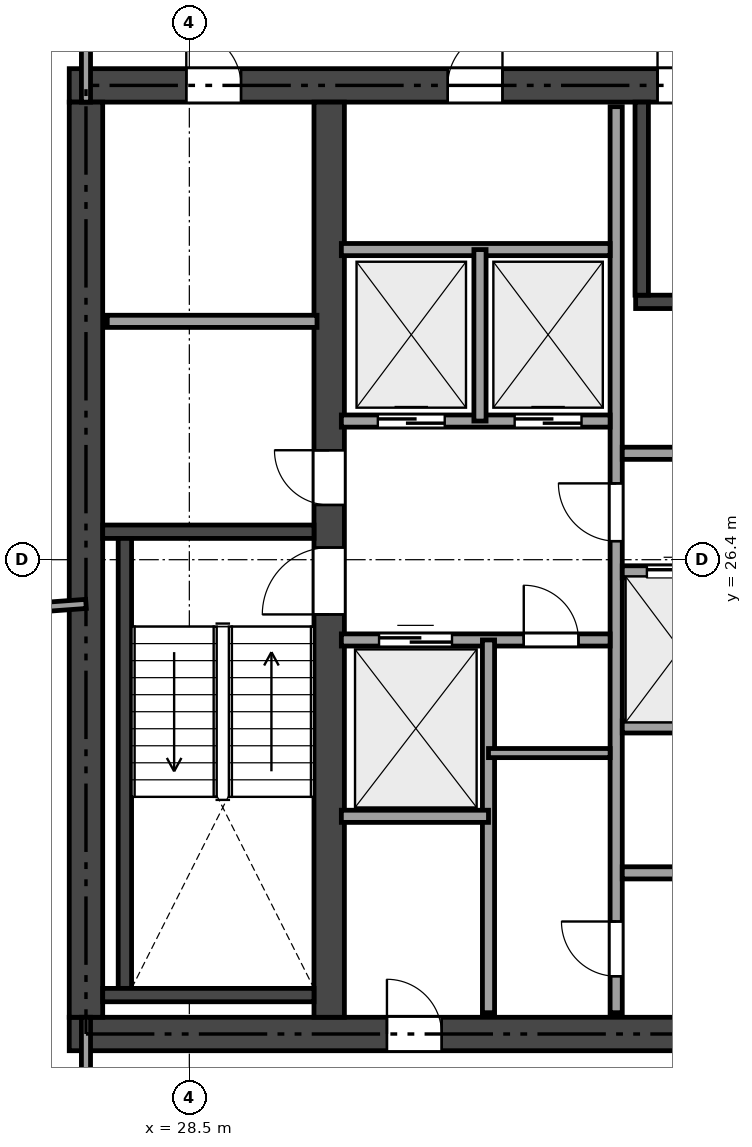
"""IFC4 building model, lengths in metres.
Left out: names, types, materials, properties, quantities, classifications, styles, units other than length and angle.
Written with IfcOpenShell. Run it as: python <this file> out.ifc"""

import sys

from ifc_helpers import new_model, si_unit, direction, frame, frame_2d, origin, place, context, subcontext, project, spatial, rectangle, extrude, element, fill, save


model = new_model("IFC4")
c1 = context("Model", 3, precision=1e-05, world=origin(), true_north=direction((0.0, 1.0)))
c2 = subcontext(c1, "Body", "Model", "MODEL_VIEW")
j1 = project(units=[si_unit("LENGTHUNIT", "METRE"), si_unit("PLANEANGLEUNIT", "RADIAN")], contexts=[c1])
p1 = place(None, origin())
s1 = spatial("IfcSite", under=j1, at=p1, CompositionType="ELEMENT")
p2 = place(p1, origin())
s2 = spatial("IfcBuilding", under=s1, at=p2, CompositionType="ELEMENT")
p3 = place(p2, frame((0.0, 0.0, 220.2)))
s3 = spatial("IfcBuildingStorey", under=s2, at=p3, CompositionType="ELEMENT", Elevation=220.2)
p4 = place(p3, frame((26.525, 18.6, 0.0), z_axis=(0.0, 0.0, 1.0), x_axis=(1.0, 0.0, 0.0)))
e1 = element("IfcWall", 1, at=p4, inside=s3, PredefinedType="SHEAR", context=c2, shape_type="SweptSolid", body=[
    extrude(rectangle(XDim=21.35, YDim=0.55, at=frame_2d((10.675, 0.0))), origin(), (0.0, 0.0, 1.0), 3.24),
])
p5 = place(p4, frame((12.4, 0.0, 0.0)))
e2 = element("IfcOpeningElement", 2, at=p5, cuts=e1, PredefinedType="OPENING", context=c2, shape_type="SweptSolid", body=[
    extrude(rectangle(XDim=1.15, YDim=2.15, at=frame_2d((0.575, 1.075))), frame((0.0, 0.285, 0.0), z_axis=(0.0, -1.0, 0.0), x_axis=(1.0, 0.0, 0.0)), (0.0, 0.0, 1.0), 0.57),
])
p6 = place(p4, frame((5.225, 0.0, 0.0)))
e3 = element("IfcOpeningElement", 3, at=p6, cuts=e1, PredefinedType="OPENING", context=c2, shape_type="SweptSolid", body=[
    extrude(rectangle(XDim=0.9, YDim=2.1, at=frame_2d((0.45, 1.05))), frame((0.0, 0.285, 0.0), z_axis=(0.0, -1.0, 0.0), x_axis=(1.0, 0.0, 0.0)), (0.0, 0.0, 1.0), 0.57),
])
p7 = place(p3, frame((26.525, 34.2, 0.0), z_axis=(0.0, 0.0, 1.0), x_axis=(1.0, 0.0, 0.0)))
e4 = element("IfcWall", 4, at=p7, inside=s3, PredefinedType="SHEAR", context=c2, shape_type="SweptSolid", body=[
    extrude(rectangle(XDim=21.35, YDim=0.55, at=frame_2d((10.675, 0.0))), origin(), (0.0, 0.0, 1.0), 3.24),
])
p8 = place(p7, frame((9.675, 0.0, 0.0)))
e5 = element("IfcOpeningElement", 5, at=p8, cuts=e4, PredefinedType="OPENING", context=c2, shape_type="SweptSolid", body=[
    extrude(rectangle(XDim=1.1, YDim=2.15, at=frame_2d((0.55, 1.075))), frame((0.0, 0.285, 0.0), z_axis=(0.0, -1.0, 0.0), x_axis=(1.0, 0.0, 0.0)), (0.0, 0.0, 1.0), 0.57),
])
p9 = place(p7, frame((1.925, 0.0, 0.0)))
e6 = element("IfcOpeningElement", 6, at=p9, cuts=e4, PredefinedType="OPENING", context=c2, shape_type="SweptSolid", body=[
    extrude(rectangle(XDim=0.9, YDim=2.1, at=frame_2d((0.45, 1.05))), frame((0.0, 0.285, 0.0), z_axis=(0.0, -1.0, 0.0), x_axis=(1.0, 0.0, 0.0)), (0.0, 0.0, 1.0), 0.57),
])
p10 = place(p7, frame((6.225, 0.0, 0.0)))
e7 = element("IfcOpeningElement", 7, at=p10, cuts=e4, PredefinedType="OPENING", context=c2, shape_type="SweptSolid", body=[
    extrude(rectangle(XDim=0.9, YDim=2.1, at=frame_2d((0.45, 1.05))), frame((0.0, 0.285, 0.0), z_axis=(0.0, -1.0, 0.0), x_axis=(1.0, 0.0, 0.0)), (0.0, 0.0, 1.0), 0.57),
])
p11 = place(p3, frame((26.8, 18.875, 0.0), z_axis=(0.0, 0.0, 1.0), x_axis=(0.0, 1.0, 0.0)))
e8 = element("IfcWall", 8, at=p11, inside=s3, PredefinedType="SHEAR", context=c2, shape_type="SweptSolid", body=[
    extrude(rectangle(XDim=15.05, YDim=0.55, at=frame_2d((7.525, 0.0))), origin(), (0.0, 0.0, 1.0), 3.24),
])
p12 = place(p3, frame((30.8, 18.875, 0.0), z_axis=(0.0, 0.0, 1.0), x_axis=(0.0, 1.0, 0.0)))
e9 = element("IfcWall", 9, at=p12, inside=s3, PredefinedType="SHEAR", context=c2, shape_type="SweptSolid", body=[
    extrude(rectangle(XDim=15.05, YDim=0.5, at=frame_2d((7.525, 0.0))), origin(), (0.0, 0.0, 1.0), 3.24),
])
p13 = place(p12, frame((6.625, 0.0, 0.0)))
e10 = element("IfcOpeningElement", 10, at=p13, cuts=e9, PredefinedType="OPENING", context=c2, shape_type="SweptSolid", body=[
    extrude(rectangle(XDim=1.1, YDim=2.15, at=frame_2d((0.55, 1.075))), frame((0.0, 0.26, 0.0), z_axis=(0.0, -1.0, 0.0), x_axis=(1.0, 0.0, 0.0)), (0.0, 0.0, 1.0), 0.52),
])
p14 = place(p12, frame((8.425, 0.0, 0.0)))
e11 = element("IfcOpeningElement", 11, at=p14, cuts=e9, PredefinedType="OPENING", context=c2, shape_type="SweptSolid", body=[
    extrude(rectangle(XDim=0.9, YDim=2.1, at=frame_2d((0.45, 1.05))), frame((0.0, 0.26, 0.0), z_axis=(0.0, -1.0, 0.0), x_axis=(1.0, 0.0, 0.0)), (0.0, 0.0, 1.0), 0.52),
])
p15 = place(p3, frame((27.075, 26.86, 0.0), z_axis=(0.0, 0.0, 1.0), x_axis=(1.0, 0.0, 0.0)))
e12 = element("IfcWall", 12, at=p15, inside=s3, PredefinedType="SHEAR", context=c2, shape_type="SweptSolid", body=[
    extrude(rectangle(XDim=3.475, YDim=0.22, at=frame_2d((1.738, 0.0))), origin(), (0.0, 0.0, 1.0), 3.24),
])
p16 = place(p3, frame((27.44, 19.35, 0.0), z_axis=(0.0, 0.0, 1.0), x_axis=(0.0, 1.0, 0.0)))
e13 = element("IfcWall", 13, at=p16, inside=s3, PredefinedType="SHEAR", context=c2, shape_type="SweptSolid", body=[
    extrude(rectangle(XDim=7.4, YDim=0.22, at=frame_2d((3.7, 0.0))), origin(), (0.0, 0.0, 1.0), 3.24),
])
p17 = place(p3, frame((27.075, 19.24, 0.0), z_axis=(0.0, 0.0, 1.0), x_axis=(1.0, 0.0, 0.0)))
e14 = element("IfcWall", 14, at=p17, inside=s3, PredefinedType="SHEAR", context=c2, shape_type="SweptSolid", body=[
    extrude(rectangle(XDim=3.475, YDim=0.22, at=frame_2d((1.738, 0.0))), origin(), (0.0, 0.0, 1.0), 3.24),
])
p18 = place(p3, frame((35.84, 30.64, 0.0), z_axis=(0.0, 0.0, 1.0), x_axis=(1.0, 0.0, 0.0)))
e15 = element("IfcWall", 15, at=p18, inside=s3, PredefinedType="SHEAR", context=c2, shape_type="SweptSolid", body=[
    extrude(rectangle(XDim=7.61, YDim=0.22, at=frame_2d((3.805, 0.0))), origin(), (0.0, 0.0, 1.0), 3.24),
])
p19 = place(p3, frame((35.94, 30.75, 0.0), z_axis=(0.0, 0.0, 1.0), x_axis=(0.0, 1.0, 0.0)))
e16 = element("IfcWall", 16, at=p19, inside=s3, PredefinedType="SHEAR", context=c2, shape_type="SweptSolid", body=[
    extrude(rectangle(XDim=3.175, YDim=0.22, at=frame_2d((1.587, 0.0))), origin(), (0.0, 0.0, 1.0), 3.24),
])
p20 = place(p3, frame((27.15, 30.32, 0.0), z_axis=(0.0, 0.0, 1.0), x_axis=(1.0, 0.0, 0.0)))
e17 = element("IfcWall", 17, at=p20, inside=s3, PredefinedType="SOLIDWALL", context=c2, shape_type="SweptSolid", body=[
    extrude(rectangle(XDim=3.45, YDim=0.2, at=frame_2d((1.725, 0.0))), origin(), (0.0, 0.0, 1.0), 3.24),
])
p21 = place(p3, frame((35.52, 18.95, 0.0), z_axis=(0.0, 0.0, 1.0), x_axis=(0.0, 1.0, 0.0)))
e18 = element("IfcWall", 18, at=p21, inside=s3, PredefinedType="SOLIDWALL", context=c2, shape_type="SweptSolid", body=[
    extrude(rectangle(XDim=14.9, YDim=0.2, at=frame_2d((7.45, 0.0))), origin(), (0.0, 0.0, 1.0), 2.761),
])
p22 = place(p21, frame((7.755, 0.0, 0.0)))
e19 = element("IfcOpeningElement", 19, at=p22, cuts=e18, PredefinedType="OPENING", context=c2, shape_type="SweptSolid", body=[
    extrude(rectangle(XDim=0.95, YDim=2.15, at=frame_2d((0.475, 1.075))), frame((0.0, 0.11, 0.0), z_axis=(0.0, -1.0, 0.0), x_axis=(1.0, 0.0, 0.0)), (0.0, 0.0, 1.0), 0.22),
])
p23 = place(p21, frame((0.6, 0.0, 0.0)))
e20 = element("IfcOpeningElement", 20, at=p23, cuts=e18, PredefinedType="OPENING", context=c2, shape_type="SweptSolid", body=[
    extrude(rectangle(XDim=0.9, YDim=2.1, at=frame_2d((0.45, 1.05))), frame((0.0, 0.11, 0.0), z_axis=(0.0, -1.0, 0.0), x_axis=(1.0, 0.0, 0.0)), (0.0, 0.0, 1.0), 0.22),
])
p24 = place(p3, frame((31.0, 28.68, 0.0), z_axis=(0.0, 0.0, 1.0), x_axis=(1.0, 0.0, 0.0)))
e21 = element("IfcWall", 21, at=p24, inside=s3, PredefinedType="SOLIDWALL", context=c2, shape_type="SweptSolid", body=[
    extrude(rectangle(XDim=4.42, YDim=0.2, at=frame_2d((2.21, 0.0))), origin(), (0.0, 0.0, 1.0), 3.24),
])
p25 = place(p24, frame((0.6, 0.0, 0.0)))
e22 = element("IfcOpeningElement", 22, at=p25, cuts=e21, PredefinedType="OPENING", context=c2, shape_type="SweptSolid", body=[
    extrude(rectangle(XDim=1.1, YDim=2.15, at=frame_2d((0.55, 1.075))), frame((0.0, 0.11, 0.0), z_axis=(0.0, -1.0, 0.0), x_axis=(1.0, 0.0, 0.0)), (0.0, 0.0, 1.0), 0.22),
])
p26 = place(p24, frame((2.85, 0.0, 0.0)))
e23 = element("IfcOpeningElement", 23, at=p26, cuts=e21, PredefinedType="OPENING", context=c2, shape_type="SweptSolid", body=[
    extrude(rectangle(XDim=1.1, YDim=2.15, at=frame_2d((0.55, 1.075))), frame((0.0, 0.11, 0.0), z_axis=(0.0, -1.0, 0.0), x_axis=(1.0, 0.0, 0.0)), (0.0, 0.0, 1.0), 0.22),
])
p27 = place(p3, frame((31.0, 31.5, 0.0), z_axis=(0.0, 0.0, 1.0), x_axis=(1.0, 0.0, 0.0)))
e24 = element("IfcWall", 24, at=p27, inside=s3, PredefinedType="SOLIDWALL", context=c2, shape_type="SweptSolid", body=[
    extrude(rectangle(XDim=4.42, YDim=0.2, at=frame_2d((2.21, 0.0))), origin(), (0.0, 0.0, 1.0), 3.24),
])
p28 = place(p3, frame((33.28, 28.68, 0.0), z_axis=(0.0, 0.0, 1.0), x_axis=(0.0, 1.0, 0.0)))
e25 = element("IfcWall", 25, at=p28, inside=s3, PredefinedType="SOLIDWALL", context=c2, shape_type="SweptSolid", body=[
    extrude(rectangle(XDim=2.82, YDim=0.2, at=frame_2d((1.41, 0.0))), origin(), (0.0, 0.0, 1.0), 3.24),
])
p29 = place(p3, frame((31.0, 25.08, 0.0), z_axis=(0.0, 0.0, 1.0), x_axis=(1.0, 0.0, 0.0)))
e26 = element("IfcWall", 26, at=p29, inside=s3, PredefinedType="SOLIDWALL", context=c2, shape_type="SweptSolid", body=[
    extrude(rectangle(XDim=4.42, YDim=0.2, at=frame_2d((2.21, 0.0))), origin(), (0.0, 0.0, 1.0), 3.24),
])
p30 = place(p29, frame((3.0, 0.0, 0.0)))
e27 = element("IfcOpeningElement", 27, at=p30, cuts=e26, PredefinedType="OPENING", context=c2, shape_type="SweptSolid", body=[
    extrude(rectangle(XDim=0.9, YDim=2.1, at=frame_2d((0.45, 1.05))), frame((0.0, 0.11, 0.0), z_axis=(0.0, -1.0, 0.0), x_axis=(1.0, 0.0, 0.0)), (0.0, 0.0, 1.0), 0.22),
])
p31 = place(p29, frame((0.62, 0.0, 0.0)))
e28 = element("IfcOpeningElement", 28, at=p31, cuts=e26, PredefinedType="OPENING", context=c2, shape_type="SweptSolid", body=[
    extrude(rectangle(XDim=1.2, YDim=2.15, at=frame_2d((0.6, 1.075))), frame((0.0, 0.11, 0.0), z_axis=(0.0, -1.0, 0.0), x_axis=(1.0, 0.0, 0.0)), (0.0, 0.0, 1.0), 0.22),
])
p32 = place(p3, frame((33.42, 18.95, 0.0), z_axis=(0.0, 0.0, 1.0), x_axis=(0.0, 1.0, 0.0)))
e29 = element("IfcWall", 29, at=p32, inside=s3, PredefinedType="SOLIDWALL", context=c2, shape_type="SweptSolid", body=[
    extrude(rectangle(XDim=6.13, YDim=0.2, at=frame_2d((3.065, 0.0))), origin(), (0.0, 0.0, 1.0), 2.761),
])
p33 = place(p3, frame((31.0, 22.18, 0.0), z_axis=(0.0, 0.0, 1.0), x_axis=(1.0, 0.0, 0.0)))
e30 = element("IfcWall", 30, at=p33, inside=s3, PredefinedType="SOLIDWALL", context=c2, shape_type="SweptSolid", body=[
    extrude(rectangle(XDim=2.42, YDim=0.2, at=frame_2d((1.21, 0.0))), origin(), (0.0, 0.0, 1.0), 3.24),
])
p34 = place(p3, frame((33.42, 23.22, 0.0), z_axis=(0.0, 0.0, 1.0), x_axis=(1.0, 0.0, 0.0)))
e31 = element("IfcWall", 31, at=p34, inside=s3, PredefinedType="PARTITIONING", context=c2, shape_type="SweptSolid", body=[
    extrude(rectangle(XDim=2.0, YDim=0.15, at=frame_2d((1.0, 0.0))), origin(), (0.0, 0.0, 1.0), 3.24),
])
p35 = place(p3, frame((35.62, 28.15, 0.0), z_axis=(0.0, 0.0, 1.0), x_axis=(1.0, 0.0, 0.0)))
e32 = element("IfcWall", 32, at=p35, inside=s3, PredefinedType="SOLIDWALL", context=c2, shape_type="SweptSolid", body=[
    extrude(rectangle(XDim=7.88, YDim=0.2, at=frame_2d((3.94, 0.0))), origin(), (0.0, 0.0, 1.0), 3.24),
])
p36 = place(p3, frame((35.62, 26.2, 0.0), z_axis=(0.0, 0.0, 1.0), x_axis=(1.0, 0.0, 0.0)))
e33 = element("IfcWall", 33, at=p36, inside=s3, PredefinedType="SOLIDWALL", context=c2, shape_type="SweptSolid", body=[
    extrude(rectangle(XDim=7.88, YDim=0.2, at=frame_2d((3.94, 0.0))), origin(), (0.0, 0.0, 1.0), 3.24),
])
p37 = place(p36, frame((0.405, 0.0, 0.0)))
e34 = element("IfcOpeningElement", 34, at=p37, cuts=e33, PredefinedType="OPENING", context=c2, shape_type="SweptSolid", body=[
    extrude(rectangle(XDim=1.1, YDim=2.15, at=frame_2d((0.55, 1.075))), frame((0.0, 0.11, 0.0), z_axis=(0.0, -1.0, 0.0), x_axis=(1.0, 0.0, 0.0)), (0.0, 0.0, 1.0), 0.22),
])
p38 = place(p36, frame((2.355, 0.0, 0.0)))
e35 = element("IfcOpeningElement", 35, at=p38, cuts=e33, PredefinedType="OPENING", context=c2, shape_type="SweptSolid", body=[
    extrude(rectangle(XDim=1.1, YDim=2.15, at=frame_2d((0.55, 1.075))), frame((0.0, 0.11, 0.0), z_axis=(0.0, -1.0, 0.0), x_axis=(1.0, 0.0, 0.0)), (0.0, 0.0, 1.0), 0.22),
])
p39 = place(p36, frame((4.305, 0.0, 0.0)))
e36 = element("IfcOpeningElement", 36, at=p39, cuts=e33, PredefinedType="OPENING", context=c2, shape_type="SweptSolid", body=[
    extrude(rectangle(XDim=1.1, YDim=2.15, at=frame_2d((0.55, 1.075))), frame((0.0, 0.11, 0.0), z_axis=(0.0, -1.0, 0.0), x_axis=(1.0, 0.0, 0.0)), (0.0, 0.0, 1.0), 0.22),
])
p40 = place(p36, frame((6.255, 0.0, 0.0)))
e37 = element("IfcOpeningElement", 37, at=p40, cuts=e33, PredefinedType="OPENING", context=c2, shape_type="SweptSolid", body=[
    extrude(rectangle(XDim=1.1, YDim=2.15, at=frame_2d((0.55, 1.075))), frame((0.0, 0.11, 0.0), z_axis=(0.0, -1.0, 0.0), x_axis=(1.0, 0.0, 0.0)), (0.0, 0.0, 1.0), 0.22),
])
p41 = place(p3, frame((35.62, 23.65, 0.0), z_axis=(0.0, 0.0, 1.0), x_axis=(1.0, 0.0, 0.0)))
e38 = element("IfcWall", 38, at=p41, inside=s3, PredefinedType="SOLIDWALL", context=c2, shape_type="SweptSolid", body=[
    extrude(rectangle(XDim=7.88, YDim=0.2, at=frame_2d((3.94, 0.0))), origin(), (0.0, 0.0, 1.0), 2.761),
])
p42 = place(p3, frame((35.62, 21.25, 0.0), z_axis=(0.0, 0.0, 1.0), x_axis=(1.0, 0.0, 0.0)))
e39 = element("IfcWall", 39, at=p42, inside=s3, PredefinedType="SOLIDWALL", context=c2, shape_type="SweptSolid", body=[
    extrude(rectangle(XDim=7.88, YDim=0.2, at=frame_2d((3.94, 0.0))), origin(), (0.0, 0.0, 1.0), 3.24),
])
p43 = place(p42, frame((1.13, 0.0, 0.0)))
e40 = element("IfcOpeningElement", 40, at=p43, cuts=e39, PredefinedType="OPENING", context=c2, shape_type="SweptSolid", body=[
    extrude(rectangle(XDim=0.9, YDim=2.1, at=frame_2d((0.45, 1.05))), frame((0.0, 0.11, 0.0), z_axis=(0.0, -1.0, 0.0), x_axis=(1.0, 0.0, 0.0)), (0.0, 0.0, 1.0), 0.22),
])
p44 = place(p42, frame((5.73, 0.0, 0.0)))
e41 = element("IfcOpeningElement", 41, at=p44, cuts=e39, PredefinedType="OPENING", context=c2, shape_type="SweptSolid", body=[
    extrude(rectangle(XDim=0.9, YDim=2.1, at=frame_2d((0.45, 1.05))), frame((0.0, 0.11, 0.0), z_axis=(0.0, -1.0, 0.0), x_axis=(1.0, 0.0, 0.0)), (0.0, 0.0, 1.0), 0.22),
])
p45 = place(p3, frame((15.938, 24.88, 0.0), z_axis=(0.0, 0.0, 1.0), x_axis=(0.997344218628, 0.072832064155, 0.0)))
e42 = element("IfcWall", 42, at=p45, inside=s3, PredefinedType="PARTITIONING", context=c2, shape_type="SweptSolid", body=[
    extrude(rectangle(XDim=10.891, YDim=0.15, at=frame_2d((5.445, 0.0))), origin(), (0.0, 0.0, 1.0), 2.825),
])
for number, where, z_axis, x_axis in (
    (43, (26.8, 33.925, 0.0), (0.0, 0.0, 1.0), (0.0, 1.0, 0.0)),
    (44, (26.8, 16.95, 0.0), (0.0, 0.0, 1.0), (0.0, 1.0, 0.0)),
):
    element("IfcWall", number, at=place(p3, frame(where, z_axis=z_axis, x_axis=x_axis)), inside=s3, PredefinedType="PARTITIONING", context=c2, shape_type="SweptSolid", body=[
        extrude(rectangle(XDim=1.925, YDim=0.15, at=frame_2d((0.962, 0.0))), origin(), (0.0, 0.0, 1.0), 2.825),
    ])
p46 = place(p13, origin())
e45 = element("IfcDoor", 45, at=p46, inside=s3, OperationType="SINGLE_SWING_LEFT", PredefinedType="DOOR", context=c2, shape_type="SweptSolid", body=[
    extrude(rectangle(XDim=1.1, YDim=2.15, at=frame_2d((0.55, 1.075))), frame((0.0, 0.025, 0.0), z_axis=(0.0, -1.0, 0.0), x_axis=(1.0, 0.0, 0.0)), (0.0, 0.0, 1.0), 0.05),
])
fill(e10, e45)
p47 = place(p8, origin())
e46 = element("IfcDoor", 46, at=p47, inside=s3, OperationType="SINGLE_SWING_LEFT", PredefinedType="DOOR", context=c2, shape_type="SweptSolid", body=[
    extrude(rectangle(XDim=1.1, YDim=2.15, at=frame_2d((0.55, 1.075))), frame((0.0, 0.025, 0.0), z_axis=(0.0, -1.0, 0.0), x_axis=(1.0, 0.0, 0.0)), (0.0, 0.0, 1.0), 0.05),
])
fill(e5, e46)
p48 = place(p22, origin())
e47 = element("IfcDoor", 47, at=p48, inside=s3, OperationType="SINGLE_SWING_RIGHT", PredefinedType="DOOR", context=c2, shape_type="SweptSolid", body=[
    extrude(rectangle(XDim=0.95, YDim=2.15, at=frame_2d((0.475, 1.075))), frame((0.0, 0.025, 0.0), z_axis=(0.0, -1.0, 0.0), x_axis=(1.0, 0.0, 0.0)), (0.0, 0.0, 1.0), 0.05),
])
fill(e19, e47)
p49 = place(p14, origin())
e48 = element("IfcDoor", 48, at=p49, inside=s3, OperationType="SINGLE_SWING_RIGHT", PredefinedType="DOOR", context=c2, shape_type="SweptSolid", body=[
    extrude(rectangle(XDim=0.9, YDim=2.1, at=frame_2d((0.45, 1.05))), frame((0.0, 0.025, 0.0), z_axis=(0.0, -1.0, 0.0), x_axis=(1.0, 0.0, 0.0)), (0.0, 0.0, 1.0), 0.05),
])
fill(e11, e48)
p50 = place(p9, origin())
e49 = element("IfcDoor", 49, at=p50, inside=s3, OperationType="SINGLE_SWING_LEFT", PredefinedType="DOOR", context=c2, shape_type="SweptSolid", body=[
    extrude(rectangle(XDim=0.9, YDim=2.1, at=frame_2d((0.45, 1.05))), frame((0.0, 0.025, 0.0), z_axis=(0.0, -1.0, 0.0), x_axis=(1.0, 0.0, 0.0)), (0.0, 0.0, 1.0), 0.05),
])
fill(e6, e49)
p51 = place(p10, origin())
e50 = element("IfcDoor", 50, at=p51, inside=s3, OperationType="SINGLE_SWING_RIGHT", PredefinedType="DOOR", context=c2, shape_type="SweptSolid", body=[
    extrude(rectangle(XDim=0.9, YDim=2.1, at=frame_2d((0.45, 1.05))), frame((0.0, 0.025, 0.0), z_axis=(0.0, -1.0, 0.0), x_axis=(1.0, 0.0, 0.0)), (0.0, 0.0, 1.0), 0.05),
])
fill(e7, e50)
p52 = place(p6, origin())
e51 = element("IfcDoor", 51, at=p52, inside=s3, OperationType="SINGLE_SWING_LEFT", PredefinedType="DOOR", context=c2, shape_type="SweptSolid", body=[
    extrude(rectangle(XDim=0.9, YDim=2.1, at=frame_2d((0.45, 1.05))), frame((0.0, 0.025, 0.0), z_axis=(0.0, -1.0, 0.0), x_axis=(1.0, 0.0, 0.0)), (0.0, 0.0, 1.0), 0.05),
])
fill(e3, e51)
p53 = place(p23, origin())
e52 = element("IfcDoor", 52, at=p53, inside=s3, OperationType="SINGLE_SWING_RIGHT", PredefinedType="DOOR", context=c2, shape_type="SweptSolid", body=[
    extrude(rectangle(XDim=0.9, YDim=2.1, at=frame_2d((0.45, 1.05))), frame((0.0, 0.025, 0.0), z_axis=(0.0, -1.0, 0.0), x_axis=(1.0, 0.0, 0.0)), (0.0, 0.0, 1.0), 0.05),
])
fill(e20, e52)
p54 = place(p30, origin())
e53 = element("IfcDoor", 53, at=p54, inside=s3, OperationType="SINGLE_SWING_LEFT", PredefinedType="DOOR", context=c2, shape_type="SweptSolid", body=[
    extrude(rectangle(XDim=0.9, YDim=2.1, at=frame_2d((0.45, 1.05))), frame((0.0, 0.025, 0.0), z_axis=(0.0, -1.0, 0.0), x_axis=(1.0, 0.0, 0.0)), (0.0, 0.0, 1.0), 0.05),
])
fill(e27, e53)
p55 = place(p25, origin())
e54 = element("IfcDoor", 54, at=p55, inside=s3, OperationType="SLIDING_TO_LEFT", PredefinedType="DOOR", context=c2, shape_type="SweptSolid", body=[
    extrude(rectangle(XDim=1.1, YDim=2.15, at=frame_2d((0.55, 1.075))), frame((0.0, 0.025, 0.0), z_axis=(0.0, -1.0, 0.0), x_axis=(1.0, 0.0, 0.0)), (0.0, 0.0, 1.0), 0.05),
])
fill(e22, e54)
p56 = place(p26, origin())
e55 = element("IfcDoor", 55, at=p56, inside=s3, OperationType="SLIDING_TO_LEFT", PredefinedType="DOOR", context=c2, shape_type="SweptSolid", body=[
    extrude(rectangle(XDim=1.1, YDim=2.15, at=frame_2d((0.55, 1.075))), frame((0.0, 0.025, 0.0), z_axis=(0.0, -1.0, 0.0), x_axis=(1.0, 0.0, 0.0)), (0.0, 0.0, 1.0), 0.05),
])
fill(e23, e55)
p57 = place(p31, origin())
e56 = element("IfcDoor", 56, at=p57, inside=s3, OperationType="SLIDING_TO_LEFT", PredefinedType="DOOR", context=c2, shape_type="SweptSolid", body=[
    extrude(rectangle(XDim=1.2, YDim=2.15, at=frame_2d((0.6, 1.075))), frame((0.0, 0.025, 0.0), z_axis=(0.0, -1.0, 0.0), x_axis=(1.0, 0.0, 0.0)), (0.0, 0.0, 1.0), 0.05),
])
fill(e28, e56)
p58 = place(p37, origin())
e57 = element("IfcDoor", 57, at=p58, inside=s3, OperationType="SLIDING_TO_LEFT", PredefinedType="DOOR", context=c2, shape_type="SweptSolid", body=[
    extrude(rectangle(XDim=1.1, YDim=2.15, at=frame_2d((0.55, 1.075))), frame((0.0, 0.025, 0.0), z_axis=(0.0, -1.0, 0.0), x_axis=(1.0, 0.0, 0.0)), (0.0, 0.0, 1.0), 0.05),
])
fill(e34, e57)
save(model, sys.argv[1])
